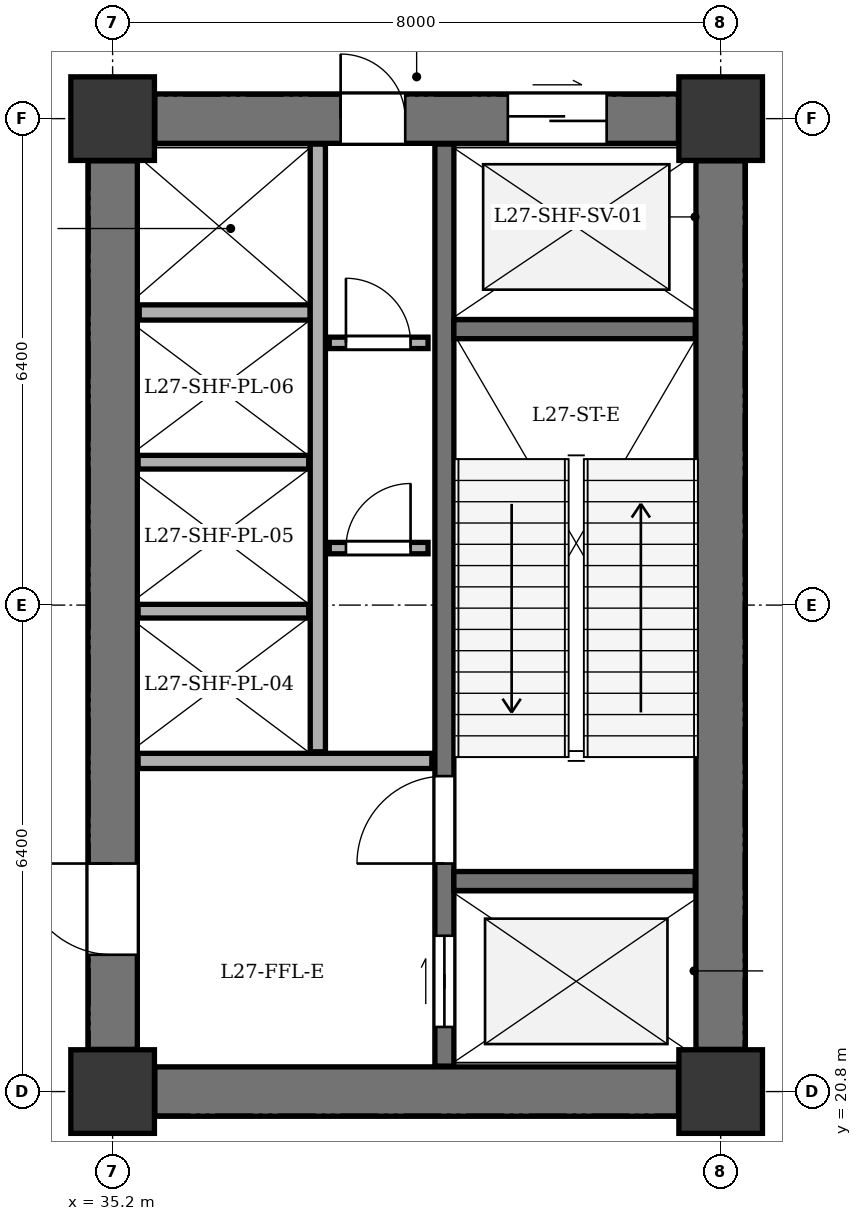
"""IFC4 building model, lengths in metres.
Left out: names, types, materials, properties, quantities, classifications, styles, units other than length and angle.
Written with IfcOpenShell. Run it as: python <this file> out.ifc"""

import sys

from ifc_helpers import new_model, si_unit, direction, frame, frame_2d, origin, origin_2d, place, context, subcontext, project, spatial, rectangle, extrude, element, fill, save


model = new_model("IFC4")
c1 = context("Model", 3, precision=1e-05, world=origin(), true_north=direction((0.0, 1.0)))
c2 = subcontext(c1, "Body", "Model", "MODEL_VIEW")
j1 = project(units=[si_unit("LENGTHUNIT", "METRE"), si_unit("PLANEANGLEUNIT", "RADIAN")], contexts=[c1])
p1 = place(None, origin())
s1 = spatial("IfcSite", under=j1, at=p1, CompositionType="ELEMENT")
p2 = place(p1, origin())
s2 = spatial("IfcBuilding", under=s1, at=p2, CompositionType="ELEMENT")
p3 = place(p2, frame((0.0, 0.0, 110.1)))
s3 = spatial("IfcBuildingStorey", under=s2, at=p3, CompositionType="ELEMENT", Elevation=110.1)
for number, where, z_axis, x_axis in (
    (1, (35.2, 20.8, 0.0), (0.0, 0.0, 1.0), (1.0, 0.0, 0.0)),
    (2, (43.2, 20.8, 0.0), (0.0, 0.0, 1.0), (1.0, 0.0, 0.0)),
    (3, (35.2, 33.6, 0.0), (0.0, 0.0, 1.0), (1.0, 0.0, 0.0)),
    (4, (43.2, 33.6, 0.0), (0.0, 0.0, 1.0), (1.0, 0.0, 0.0)),
):
    element("IfcColumn", number, at=place(p3, frame(where, z_axis=z_axis, x_axis=x_axis)), inside=s3, PredefinedType="COLUMN", context=c2, shape_type="SweptSolid", body=[
        extrude(rectangle(XDim=1.1, YDim=1.1, at=origin_2d()), origin(), (0.0, 0.0, 1.0), 5.4),
    ])
p4 = place(p3, frame((43.2, 21.355, 0.0), z_axis=(0.0, 0.0, 1.0), x_axis=(0.0, 1.0, 0.0)))
e5 = element("IfcWall", 5, at=p4, inside=s3, PredefinedType="SHEAR", context=c2, shape_type="SweptSolid", body=[
    extrude(rectangle(XDim=11.69, YDim=0.65, at=frame_2d((5.845, 0.0))), origin(), (0.0, 0.0, 1.0), 5.04),
])
p5 = place(p3, frame((35.755, 20.8, 0.0), z_axis=(0.0, 0.0, 1.0), x_axis=(1.0, 0.0, 0.0)))
e6 = element("IfcWall", 6, at=p5, inside=s3, PredefinedType="SHEAR", context=c2, shape_type="SweptSolid", body=[
    extrude(rectangle(XDim=6.89, YDim=0.65, at=frame_2d((3.445, 0.0))), origin(), (0.0, 0.0, 1.0), 5.04),
])
p6 = place(p3, frame((35.755, 33.6, 0.0), z_axis=(0.0, 0.0, 1.0), x_axis=(1.0, 0.0, 0.0)))
e7 = element("IfcWall", 7, at=p6, inside=s3, PredefinedType="SHEAR", context=c2, shape_type="SweptSolid", body=[
    extrude(rectangle(XDim=6.89, YDim=0.65, at=frame_2d((3.445, 0.0))), origin(), (0.0, 0.0, 1.0), 5.04),
])
p7 = place(p6, frame((4.645, 0.0, 0.0)))
e8 = element("IfcOpeningElement", 8, at=p7, cuts=e7, PredefinedType="OPENING", context=c2, shape_type="SweptSolid", body=[
    extrude(rectangle(XDim=1.3, YDim=2.15, at=frame_2d((0.65, 1.075))), frame((0.0, 0.335, 0.0), z_axis=(0.0, -1.0, 0.0), x_axis=(1.0, 0.0, 0.0)), (0.0, 0.0, 1.0), 0.67),
])
p8 = place(p6, frame((2.445, 0.0, 0.0)))
e9 = element("IfcOpeningElement", 9, at=p8, cuts=e7, PredefinedType="OPENING", context=c2, shape_type="SweptSolid", body=[
    extrude(rectangle(XDim=0.85, YDim=2.02, at=frame_2d((0.425, 1.01))), frame((0.0, 0.335, 0.0), z_axis=(0.0, -1.0, 0.0), x_axis=(1.0, 0.0, 0.0)), (0.0, 0.0, 1.0), 0.67),
])
p9 = place(p3, frame((35.2, 21.355, 0.0), z_axis=(0.0, 0.0, 1.0), x_axis=(0.0, 1.0, 0.0)))
e10 = element("IfcWall", 10, at=p9, inside=s3, PredefinedType="SHEAR", context=c2, shape_type="SweptSolid", body=[
    extrude(rectangle(XDim=11.69, YDim=0.65, at=frame_2d((5.845, 0.0))), origin(), (0.0, 0.0, 1.0), 5.04),
])
p10 = place(p9, frame((1.245, 0.0, 0.0)))
e11 = element("IfcOpeningElement", 11, at=p10, cuts=e10, PredefinedType="OPENING", context=c2, shape_type="SweptSolid", body=[
    extrude(rectangle(XDim=1.2, YDim=2.15, at=frame_2d((0.6, 1.075))), frame((0.0, 0.335, 0.0), z_axis=(0.0, -1.0, 0.0), x_axis=(1.0, 0.0, 0.0)), (0.0, 0.0, 1.0), 0.67),
])
p11 = place(p3, frame((39.565, 21.135, 0.0), z_axis=(0.0, 0.0, 1.0), x_axis=(0.0, 1.0, 0.0)))
e12 = element("IfcWall", 12, at=p11, inside=s3, PredefinedType="SHEAR", context=c2, shape_type="SweptSolid", body=[
    extrude(rectangle(XDim=12.13, YDim=0.25, at=frame_2d((6.065, 0.0))), origin(), (0.0, 0.0, 1.0), 5.04),
])
p12 = place(p11, frame((0.515, 0.0, 0.0)))
e13 = element("IfcOpeningElement", 13, at=p12, cuts=e12, PredefinedType="OPENING", context=c2, shape_type="SweptSolid", body=[
    extrude(rectangle(XDim=1.2, YDim=2.15, at=frame_2d((0.6, 1.075))), frame((0.0, 0.135, 0.0), z_axis=(0.0, -1.0, 0.0), x_axis=(1.0, 0.0, 0.0)), (0.0, 0.0, 1.0), 0.27),
])
p13 = place(p11, frame((2.665, 0.0, 0.0)))
e14 = element("IfcOpeningElement", 14, at=p13, cuts=e12, PredefinedType="OPENING", context=c2, shape_type="SweptSolid", body=[
    extrude(rectangle(XDim=1.15, YDim=2.15, at=frame_2d((0.575, 1.075))), frame((0.0, 0.135, 0.0), z_axis=(0.0, -1.0, 0.0), x_axis=(1.0, 0.0, 0.0)), (0.0, 0.0, 1.0), 0.27),
])
for number, where, z_axis, x_axis in (
    (15, (39.69, 23.57, 0.0), (0.0, 0.0, 1.0), (1.0, 0.0, 0.0)),
    (16, (39.69, 30.83, 0.0), (0.0, 0.0, 1.0), (1.0, 0.0, 0.0)),
):
    element("IfcWall", number, at=place(p3, frame(where, z_axis=z_axis, x_axis=x_axis)), inside=s3, PredefinedType="SHEAR", context=c2, shape_type="SweptSolid", body=[
        extrude(rectangle(XDim=3.175, YDim=0.25, at=frame_2d((1.587, 0.0))), origin(), (0.0, 0.0, 1.0), 5.04),
    ])
p14 = place(p3, frame((35.535, 25.15, 0.0), z_axis=(0.0, 0.0, 1.0), x_axis=(1.0, 0.0, 0.0)))
e17 = element("IfcWall", 17, at=p14, inside=s3, PredefinedType="SOLIDWALL", context=c2, shape_type="SweptSolid", body=[
    extrude(rectangle(XDim=3.865, YDim=0.2, at=frame_2d((1.933, 0.0))), origin(), (0.0, 0.0, 1.0), 5.04),
])
p15 = place(p3, frame((35.55, 31.05, 0.0), z_axis=(0.0, 0.0, 1.0), x_axis=(1.0, 0.0, 0.0)))
e18 = element("IfcWall", 18, at=p15, inside=s3, PredefinedType="SOLIDWALL", context=c2, shape_type="SweptSolid", body=[
    extrude(rectangle(XDim=2.25, YDim=0.2, at=frame_2d((1.125, 0.0))), origin(), (0.0, 0.0, 1.0), 5.04),
])
p16 = place(p3, frame((37.9, 25.27, 0.0), z_axis=(0.0, 0.0, 1.0), x_axis=(0.0, 1.0, 0.0)))
e19 = element("IfcWall", 19, at=p16, inside=s3, PredefinedType="SOLIDWALL", context=c2, shape_type="SweptSolid", body=[
    extrude(rectangle(XDim=7.995, YDim=0.2, at=frame_2d((3.998, 0.0))), origin(), (0.0, 0.0, 1.0), 5.04),
])
for number, where, z_axis, x_axis in (
    (20, (35.535, 27.12, 0.0), (0.0, 0.0, 1.0), (1.0, 0.0, 0.0)),
    (21, (35.535, 29.08, 0.0), (0.0, 0.0, 1.0), (1.0, 0.0, 0.0)),
):
    element("IfcWall", number, at=place(p3, frame(where, z_axis=z_axis, x_axis=x_axis)), inside=s3, PredefinedType="PARTITIONING", context=c2, shape_type="SweptSolid", body=[
        extrude(rectangle(XDim=2.245, YDim=0.18, at=frame_2d((1.123, 0.0))), origin(), (0.0, 0.0, 1.0), 5.04),
    ])
p17 = place(p3, frame((38.05, 27.95, 0.0), z_axis=(0.0, 0.0, 1.0), x_axis=(1.0, 0.0, 0.0)))
e22 = element("IfcWall", 22, at=p17, inside=s3, PredefinedType="PARTITIONING", context=c2, shape_type="SweptSolid", body=[
    extrude(rectangle(XDim=1.3, YDim=0.15, at=frame_2d((0.65, 0.0))), origin(), (0.0, 0.0, 1.0), 5.04),
])
p18 = place(p17, frame((0.22, 0.0, 0.0)))
e23 = element("IfcOpeningElement", 23, at=p18, cuts=e22, PredefinedType="OPENING", context=c2, shape_type="SweptSolid", body=[
    extrude(rectangle(XDim=0.85, YDim=2.02, at=frame_2d((0.425, 1.01))), frame((0.0, 0.085, 0.0), z_axis=(0.0, -1.0, 0.0), x_axis=(1.0, 0.0, 0.0)), (0.0, 0.0, 1.0), 0.17),
])
p19 = place(p3, frame((38.05, 30.65, 0.0), z_axis=(0.0, 0.0, 1.0), x_axis=(1.0, 0.0, 0.0)))
e24 = element("IfcWall", 24, at=p19, inside=s3, PredefinedType="PARTITIONING", context=c2, shape_type="SweptSolid", body=[
    extrude(rectangle(XDim=1.3, YDim=0.15, at=frame_2d((0.65, 0.0))), origin(), (0.0, 0.0, 1.0), 5.04),
])
p20 = place(p19, frame((0.22, 0.0, 0.0)))
e25 = element("IfcOpeningElement", 25, at=p20, cuts=e24, PredefinedType="OPENING", context=c2, shape_type="SweptSolid", body=[
    extrude(rectangle(XDim=0.85, YDim=2.02, at=frame_2d((0.425, 1.01))), frame((0.0, 0.085, 0.0), z_axis=(0.0, -1.0, 0.0), x_axis=(1.0, 0.0, 0.0)), (0.0, 0.0, 1.0), 0.17),
])
p21 = place(p7, origin())
e26 = element("IfcDoor", 26, at=p21, inside=s3, OperationType="DOUBLE_DOOR_SLIDING", PredefinedType="DOOR", context=c2, shape_type="SweptSolid", body=[
    extrude(rectangle(XDim=1.3, YDim=2.15, at=frame_2d((0.65, 1.075))), frame((0.0, 0.025, 0.0), z_axis=(0.0, -1.0, 0.0), x_axis=(1.0, 0.0, 0.0)), (0.0, 0.0, 1.0), 0.05),
])
fill(e8, e26)
p22 = place(p8, origin())
e27 = element("IfcDoor", 27, at=p22, inside=s3, OperationType="SINGLE_SWING_LEFT", PredefinedType="DOOR", context=c2, shape_type="SweptSolid", body=[
    extrude(rectangle(XDim=0.85, YDim=2.02, at=frame_2d((0.425, 1.01))), frame((0.0, 0.025, 0.0), z_axis=(0.0, -1.0, 0.0), x_axis=(1.0, 0.0, 0.0)), (0.0, 0.0, 1.0), 0.05),
])
fill(e9, e27)
p23 = place(p10, origin())
e28 = element("IfcDoor", 28, at=p23, inside=s3, OperationType="SINGLE_SWING_RIGHT", PredefinedType="DOOR", context=c2, shape_type="SweptSolid", body=[
    extrude(rectangle(XDim=1.2, YDim=2.15, at=frame_2d((0.6, 1.075))), frame((0.0, 0.025, 0.0), z_axis=(0.0, -1.0, 0.0), x_axis=(1.0, 0.0, 0.0)), (0.0, 0.0, 1.0), 0.05),
])
fill(e11, e28)
p24 = place(p12, origin())
e29 = element("IfcDoor", 29, at=p24, inside=s3, OperationType="DOUBLE_DOOR_SLIDING", PredefinedType="DOOR", context=c2, shape_type="SweptSolid", body=[
    extrude(rectangle(XDim=1.2, YDim=2.15, at=frame_2d((0.6, 1.075))), frame((0.0, 0.025, 0.0), z_axis=(0.0, -1.0, 0.0), x_axis=(1.0, 0.0, 0.0)), (0.0, 0.0, 1.0), 0.05),
])
fill(e13, e29)
p25 = place(p13, origin())
e30 = element("IfcDoor", 30, at=p25, inside=s3, OperationType="SINGLE_SWING_LEFT", PredefinedType="DOOR", context=c2, shape_type="SweptSolid", body=[
    extrude(rectangle(XDim=1.15, YDim=2.15, at=frame_2d((0.575, 1.075))), frame((0.0, 0.025, 0.0), z_axis=(0.0, -1.0, 0.0), x_axis=(1.0, 0.0, 0.0)), (0.0, 0.0, 1.0), 0.05),
])
fill(e14, e30)
p26 = place(p18, origin())
e31 = element("IfcDoor", 31, at=p26, inside=s3, OperationType="SINGLE_SWING_RIGHT", PredefinedType="DOOR", context=c2, shape_type="SweptSolid", body=[
    extrude(rectangle(XDim=0.85, YDim=2.02, at=frame_2d((0.425, 1.01))), frame((0.0, 0.025, 0.0), z_axis=(0.0, -1.0, 0.0), x_axis=(1.0, 0.0, 0.0)), (0.0, 0.0, 1.0), 0.05),
])
fill(e23, e31)
p27 = place(p20, origin())
e32 = element("IfcDoor", 32, at=p27, inside=s3, OperationType="SINGLE_SWING_LEFT", PredefinedType="DOOR", context=c2, shape_type="SweptSolid", body=[
    extrude(rectangle(XDim=0.85, YDim=2.02, at=frame_2d((0.425, 1.01))), frame((0.0, 0.025, 0.0), z_axis=(0.0, -1.0, 0.0), x_axis=(1.0, 0.0, 0.0)), (0.0, 0.0, 1.0), 0.05),
])
fill(e25, e32)
save(model, sys.argv[1])
